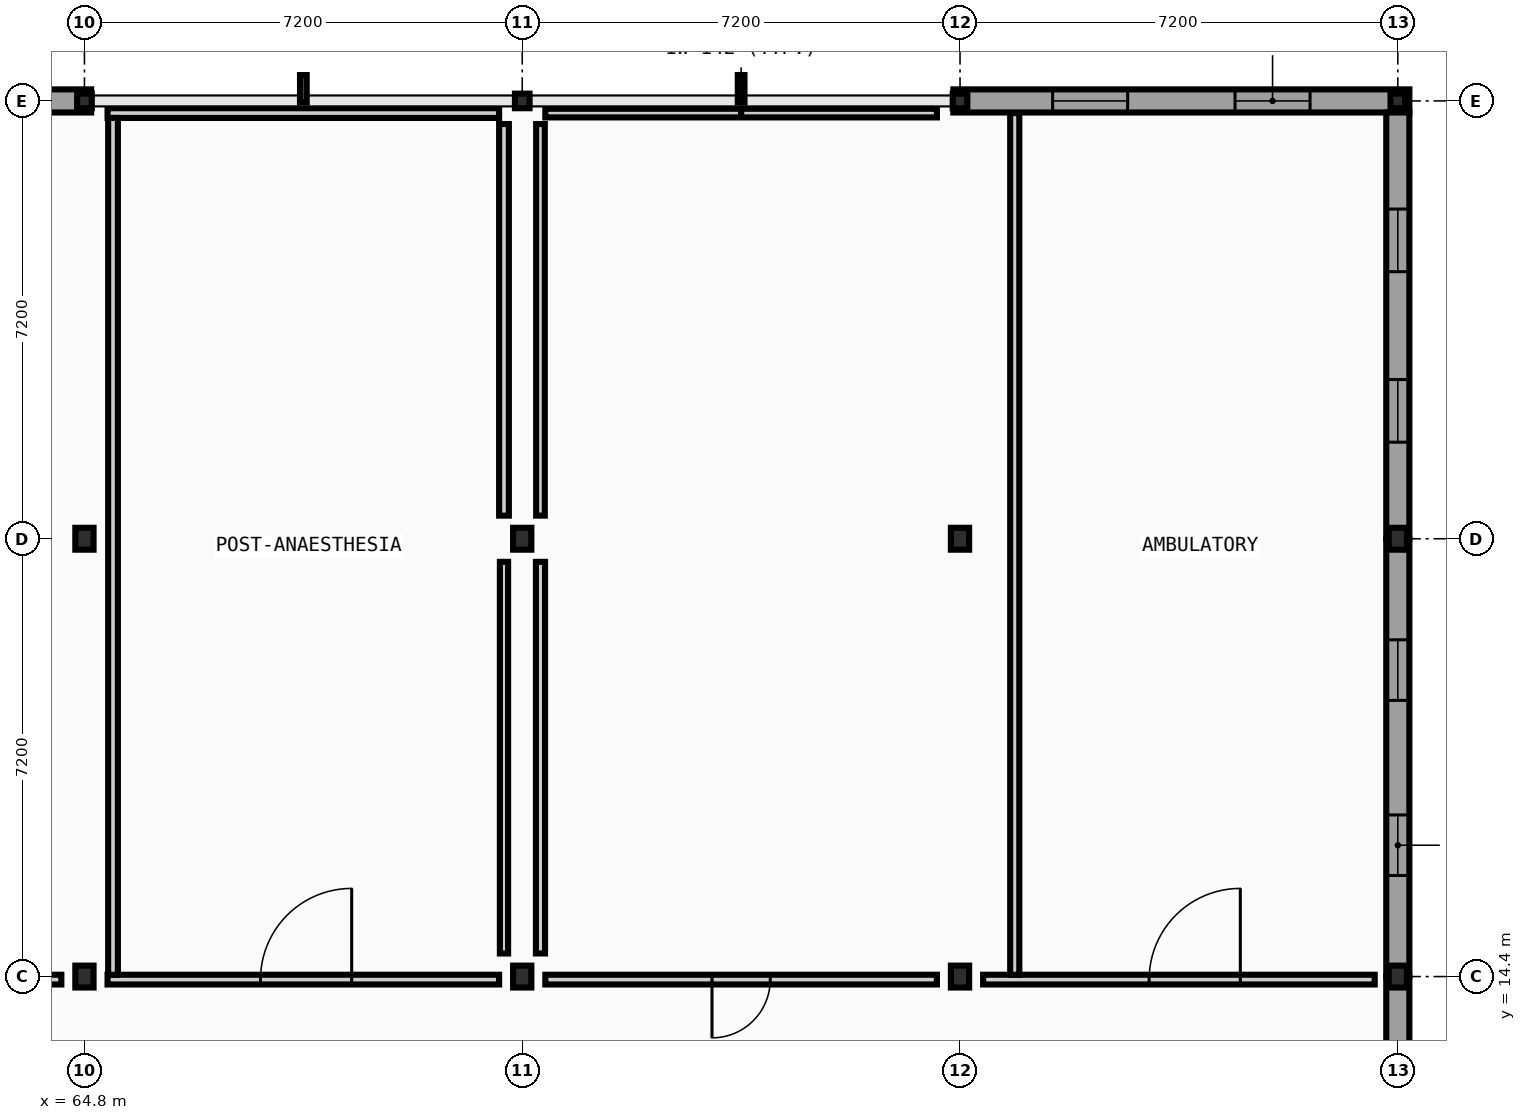
"""IFC4 building model, lengths in metres.
Left out: names, types, materials, properties, quantities, classifications, styles, units other than length and angle.
Written with IfcOpenShell. Run it as: python <this file> out.ifc"""

import sys

from ifc_helpers import new_model, si_unit, direction, frame, frame_2d, origin, origin_2d, place, context, subcontext, project, spatial, rectangle, i_section, extrude, element, fill, save


model = new_model("IFC4")
c1 = context("Model", 3, precision=1e-05, world=origin(), true_north=direction((0.0, 1.0)))
c2 = subcontext(c1, "Body", "Model", "MODEL_VIEW")
j1 = project(units=[si_unit("LENGTHUNIT", "METRE"), si_unit("PLANEANGLEUNIT", "RADIAN")], contexts=[c1])
p1 = place(None, origin())
s1 = spatial("IfcSite", under=j1, at=p1, CompositionType="ELEMENT")
p2 = place(p1, origin())
s2 = spatial("IfcBuilding", under=s1, at=p2, CompositionType="ELEMENT")
p3 = place(p2, frame((0.0, 0.0, 9.6)))
s3 = spatial("IfcBuildingStorey", under=s2, at=p3, CompositionType="ELEMENT", Elevation=9.6)
for number, where, z_axis, x_axis in (
    (1, (64.8, 14.4, 0.0), (0.0, 0.0, 1.0), (1.0, 0.0, 0.0)),
    (2, (64.8, 21.6, 0.0), (0.0, 0.0, 1.0), (1.0, 0.0, 0.0)),
):
    element("IfcColumn", number, at=place(p3, frame(where, z_axis=z_axis, x_axis=x_axis)), inside=s3, PredefinedType="COLUMN", context=c2, shape_type="SweptSolid", body=[
        extrude(i_section(OverallWidth=0.3, OverallDepth=0.36, WebThickness=0.012, FlangeThickness=0.022, FilletRadius=0.027, at=origin_2d()), origin(), (0.0, 0.0, 1.0), 4.4),
    ])
p4 = place(p3, frame((64.8, 28.8, 0.0), z_axis=(0.0, 0.0, 1.0), x_axis=(1.0, 0.0, 0.0)))
e3 = element("IfcColumn", 3, at=p4, inside=s3, PredefinedType="COLUMN", context=c2, shape_type="SweptSolid", body=[
    extrude(i_section(OverallWidth=0.24, OverallDepth=0.24, WebThickness=0.01, FlangeThickness=0.017, FilletRadius=0.021, at=origin_2d()), origin(), (0.0, 0.0, 1.0), 4.4),
])
for number, where, z_axis, x_axis in (
    (4, (72.0, 14.4, 0.0), (0.0, 0.0, 1.0), (1.0, 0.0, 0.0)),
    (5, (72.0, 21.6, 0.0), (0.0, 0.0, 1.0), (1.0, 0.0, 0.0)),
):
    element("IfcColumn", number, at=place(p3, frame(where, z_axis=z_axis, x_axis=x_axis)), inside=s3, PredefinedType="COLUMN", context=c2, shape_type="SweptSolid", body=[
        extrude(i_section(OverallWidth=0.3, OverallDepth=0.36, WebThickness=0.012, FlangeThickness=0.022, FilletRadius=0.027, at=origin_2d()), origin(), (0.0, 0.0, 1.0), 4.4),
    ])
p5 = place(p3, frame((72.0, 28.8, 0.0), z_axis=(0.0, 0.0, 1.0), x_axis=(1.0, 0.0, 0.0)))
e6 = element("IfcColumn", 6, at=p5, inside=s3, PredefinedType="COLUMN", context=c2, shape_type="SweptSolid", body=[
    extrude(i_section(OverallWidth=0.24, OverallDepth=0.24, WebThickness=0.01, FlangeThickness=0.017, FilletRadius=0.021, at=origin_2d()), origin(), (0.0, 0.0, 1.0), 4.4),
])
for number, where, z_axis, x_axis in (
    (7, (79.2, 14.4, 0.0), (0.0, 0.0, 1.0), (1.0, 0.0, 0.0)),
    (8, (79.2, 21.6, 0.0), (0.0, 0.0, 1.0), (1.0, 0.0, 0.0)),
):
    element("IfcColumn", number, at=place(p3, frame(where, z_axis=z_axis, x_axis=x_axis)), inside=s3, PredefinedType="COLUMN", context=c2, shape_type="SweptSolid", body=[
        extrude(i_section(OverallWidth=0.3, OverallDepth=0.36, WebThickness=0.012, FlangeThickness=0.022, FilletRadius=0.027, at=origin_2d()), origin(), (0.0, 0.0, 1.0), 4.4),
    ])
p6 = place(p3, frame((79.2, 28.8, 0.0), z_axis=(0.0, 0.0, 1.0), x_axis=(1.0, 0.0, 0.0)))
e9 = element("IfcColumn", 9, at=p6, inside=s3, PredefinedType="COLUMN", context=c2, shape_type="SweptSolid", body=[
    extrude(i_section(OverallWidth=0.24, OverallDepth=0.24, WebThickness=0.01, FlangeThickness=0.017, FilletRadius=0.021, at=origin_2d()), origin(), (0.0, 0.0, 1.0), 4.4),
])
for number, where, z_axis, x_axis in (
    (10, (86.4, 14.4, 0.0), (0.0, 0.0, 1.0), (1.0, 0.0, 0.0)),
    (11, (86.4, 21.6, 0.0), (0.0, 0.0, 1.0), (1.0, 0.0, 0.0)),
):
    element("IfcColumn", number, at=place(p3, frame(where, z_axis=z_axis, x_axis=x_axis)), inside=s3, PredefinedType="COLUMN", context=c2, shape_type="SweptSolid", body=[
        extrude(i_section(OverallWidth=0.3, OverallDepth=0.36, WebThickness=0.012, FlangeThickness=0.022, FilletRadius=0.027, at=origin_2d()), origin(), (0.0, 0.0, 1.0), 4.4),
    ])
p7 = place(p3, frame((86.4, 28.8, 0.0), z_axis=(0.0, 0.0, 1.0), x_axis=(1.0, 0.0, 0.0)))
e12 = element("IfcColumn", 12, at=p7, inside=s3, PredefinedType="COLUMN", context=c2, shape_type="SweptSolid", body=[
    extrude(i_section(OverallWidth=0.24, OverallDepth=0.24, WebThickness=0.01, FlangeThickness=0.017, FilletRadius=0.021, at=origin_2d()), origin(), (0.0, 0.0, 1.0), 4.4),
])
p8 = place(p3, frame((64.91, 28.8, 0.0), z_axis=(0.0, 0.0, 1.0), x_axis=(-1.0, 0.0, 0.0)))
e13 = element("IfcWall", 13, at=p8, inside=s3, PredefinedType="STANDARD", context=c2, shape_type="SweptSolid", body=[
    extrude(rectangle(XDim=6.4, YDim=0.38, at=frame_2d((3.2, 0.0))), origin(), (0.0, 0.0, 1.0), 3.9),
])
p9 = place(p3, frame((86.59, 28.8, 0.0), z_axis=(0.0, 0.0, 1.0), x_axis=(-1.0, 0.0, 0.0)))
e14 = element("IfcWall", 14, at=p9, inside=s3, PredefinedType="STANDARD", context=c2, shape_type="SweptSolid", body=[
    extrude(rectangle(XDim=7.5, YDim=0.38, at=frame_2d((3.75, 0.0))), origin(), (0.0, 0.0, 1.0), 3.9),
])
p10 = place(p9, frame((1.633, 0.0, 0.95)))
e15 = element("IfcOpeningElement", 15, at=p10, cuts=e14, PredefinedType="OPENING", context=c2, shape_type="SweptSolid", body=[
    extrude(rectangle(XDim=1.234, YDim=1.296, at=frame_2d((0.617, 0.648))), frame((0.0, 0.2, 0.0), z_axis=(0.0, -1.0, 0.0), x_axis=(1.0, 0.0, 0.0)), (0.0, 0.0, 1.0), 0.4),
])
p11 = place(p9, frame((4.633, 0.0, 0.95)))
e16 = element("IfcOpeningElement", 16, at=p11, cuts=e14, PredefinedType="OPENING", context=c2, shape_type="SweptSolid", body=[
    extrude(rectangle(XDim=1.234, YDim=1.296, at=frame_2d((0.617, 0.648))), frame((0.0, 0.2, 0.0), z_axis=(0.0, -1.0, 0.0), x_axis=(1.0, 0.0, 0.0)), (0.0, 0.0, 1.0), 0.4),
])
p12 = place(p3, frame((86.4, 8.9, 0.0), z_axis=(0.0, 0.0, 1.0), x_axis=(0.0, 1.0, 0.0)))
e17 = element("IfcWall", 17, at=p12, inside=s3, PredefinedType="STANDARD", context=c2, shape_type="SweptSolid", body=[
    extrude(rectangle(XDim=5.5, YDim=0.38, at=frame_2d((2.75, 0.0))), origin(), (0.0, 0.0, 1.0), 4.2),
])
p13 = place(p3, frame((86.4, 14.4, 0.0), z_axis=(0.0, 0.0, 1.0), x_axis=(0.0, 1.0, 0.0)))
e18 = element("IfcWall", 18, at=p13, inside=s3, PredefinedType="STANDARD", context=c2, shape_type="SweptSolid", body=[
    extrude(rectangle(XDim=7.2, YDim=0.38, at=frame_2d((3.6, 0.0))), origin(), (0.0, 0.0, 1.0), 3.885),
])
p14 = place(p13, frame((1.662, 0.0, 0.95)))
e19 = element("IfcOpeningElement", 19, at=p14, cuts=e18, PredefinedType="OPENING", context=c2, shape_type="SweptSolid", body=[
    extrude(rectangle(XDim=0.996, YDim=1.332, at=frame_2d((0.498, 0.666))), frame((0.0, 0.2, 0.0), z_axis=(0.0, -1.0, 0.0), x_axis=(1.0, 0.0, 0.0)), (0.0, 0.0, 1.0), 0.4),
])
p15 = place(p13, frame((4.542, 0.0, 0.95)))
e20 = element("IfcOpeningElement", 20, at=p15, cuts=e18, PredefinedType="OPENING", context=c2, shape_type="SweptSolid", body=[
    extrude(rectangle(XDim=0.996, YDim=1.332, at=frame_2d((0.498, 0.666))), frame((0.0, 0.2, 0.0), z_axis=(0.0, -1.0, 0.0), x_axis=(1.0, 0.0, 0.0)), (0.0, 0.0, 1.0), 0.4),
])
p16 = place(p3, frame((86.4, 21.6, 0.0), z_axis=(0.0, 0.0, 1.0), x_axis=(0.0, 1.0, 0.0)))
e21 = element("IfcWall", 21, at=p16, inside=s3, PredefinedType="STANDARD", context=c2, shape_type="SweptSolid", body=[
    extrude(rectangle(XDim=7.01, YDim=0.38, at=frame_2d((3.505, 0.0))), origin(), (0.0, 0.0, 1.0), 3.89),
])
p17 = place(p16, frame((1.588, 0.0, 0.95)))
e22 = element("IfcOpeningElement", 22, at=p17, cuts=e21, PredefinedType="OPENING", context=c2, shape_type="SweptSolid", body=[
    extrude(rectangle(XDim=1.03, YDim=1.332, at=frame_2d((0.515, 0.666))), frame((0.0, 0.2, 0.0), z_axis=(0.0, -1.0, 0.0), x_axis=(1.0, 0.0, 0.0)), (0.0, 0.0, 1.0), 0.4),
])
p18 = place(p16, frame((4.392, 0.0, 0.95)))
e23 = element("IfcOpeningElement", 23, at=p18, cuts=e21, PredefinedType="OPENING", context=c2, shape_type="SweptSolid", body=[
    extrude(rectangle(XDim=1.03, YDim=1.332, at=frame_2d((0.515, 0.666))), frame((0.0, 0.2, 0.0), z_axis=(0.0, -1.0, 0.0), x_axis=(1.0, 0.0, 0.0)), (0.0, 0.0, 1.0), 0.4),
])
p19 = place(p3, frame((58.7, 14.35, 0.0), z_axis=(0.0, 0.0, 1.0), x_axis=(1.0, 0.0, 0.0)))
e24 = element("IfcWall", 24, at=p19, inside=s3, PredefinedType="PARTITIONING", context=c2, shape_type="SweptSolid", body=[
    extrude(rectangle(XDim=5.72, YDim=0.16, at=frame_2d((2.86, 0.0))), origin(), (0.0, 0.0, 1.0), 3.895),
])
p20 = place(p19, frame((1.96, 0.0, 0.0)))
e25 = element("IfcOpeningElement", 25, at=p20, cuts=e24, PredefinedType="OPENING", context=c2, shape_type="SweptSolid", body=[
    extrude(rectangle(XDim=1.8, YDim=2.3, at=frame_2d((0.9, 1.15))), frame((0.0, 0.09, 0.0), z_axis=(0.0, -1.0, 0.0), x_axis=(1.0, 0.0, 0.0)), (0.0, 0.0, 1.0), 0.18),
])
p21 = place(p3, frame((65.18, 14.35, 0.0), z_axis=(0.0, 0.0, 1.0), x_axis=(1.0, 0.0, 0.0)))
e26 = element("IfcWall", 26, at=p21, inside=s3, PredefinedType="PARTITIONING", context=c2, shape_type="SweptSolid", body=[
    extrude(rectangle(XDim=6.44, YDim=0.16, at=frame_2d((3.22, 0.0))), origin(), (0.0, 0.0, 1.0), 3.895),
])
p22 = place(p21, frame((2.515, 0.0, 0.0)))
e27 = element("IfcOpeningElement", 27, at=p22, cuts=e26, PredefinedType="OPENING", context=c2, shape_type="SweptSolid", body=[
    extrude(rectangle(XDim=1.5, YDim=2.2, at=frame_2d((0.75, 1.1))), frame((0.0, 0.09, 0.0), z_axis=(0.0, -1.0, 0.0), x_axis=(1.0, 0.0, 0.0)), (0.0, 0.0, 1.0), 0.18),
])
p23 = place(p3, frame((72.38, 14.35, 0.0), z_axis=(0.0, 0.0, 1.0), x_axis=(1.0, 0.0, 0.0)))
e28 = element("IfcWall", 28, at=p23, inside=s3, PredefinedType="PARTITIONING", context=c2, shape_type="SweptSolid", body=[
    extrude(rectangle(XDim=6.44, YDim=0.16, at=frame_2d((3.22, 0.0))), origin(), (0.0, 0.0, 1.0), 3.895),
])
p24 = place(p23, frame((2.741, 0.0, 0.0)))
e29 = element("IfcOpeningElement", 29, at=p24, cuts=e28, PredefinedType="OPENING", context=c2, shape_type="SweptSolid", body=[
    extrude(rectangle(XDim=0.958, YDim=2.152, at=frame_2d((0.479, 1.076))), frame((0.0, 0.09, 0.0), z_axis=(0.0, -1.0, 0.0), x_axis=(1.0, 0.0, 0.0)), (0.0, 0.0, 1.0), 0.18),
])
p25 = place(p3, frame((79.58, 14.35, 0.0), z_axis=(0.0, 0.0, 1.0), x_axis=(1.0, 0.0, 0.0)))
e30 = element("IfcWall", 30, at=p25, inside=s3, PredefinedType="PARTITIONING", context=c2, shape_type="SweptSolid", body=[
    extrude(rectangle(XDim=6.44, YDim=0.16, at=frame_2d((3.22, 0.0))), origin(), (0.0, 0.0, 1.0), 3.895),
])
p26 = place(p25, frame((2.73, 0.0, 0.0)))
e31 = element("IfcOpeningElement", 31, at=p26, cuts=e30, PredefinedType="OPENING", context=c2, shape_type="SweptSolid", body=[
    extrude(rectangle(XDim=1.5, YDim=2.2, at=frame_2d((0.75, 1.1))), frame((0.0, 0.09, 0.0), z_axis=(0.0, -1.0, 0.0), x_axis=(1.0, 0.0, 0.0)), (0.0, 0.0, 1.0), 0.18),
])
p27 = place(p3, frame((65.18, 28.6, 0.0), z_axis=(0.0, 0.0, 1.0), x_axis=(1.0, 0.0, 0.0)))
e32 = element("IfcWall", 32, at=p27, inside=s3, PredefinedType="PARTITIONING", context=c2, shape_type="SweptSolid", body=[
    extrude(rectangle(XDim=6.44, YDim=0.16, at=frame_2d((3.22, 0.0))), origin(), (0.0, 0.0, 1.0), 3.9),
])
p28 = place(p3, frame((72.38, 28.6, 0.0), z_axis=(0.0, 0.0, 1.0), x_axis=(1.0, 0.0, 0.0)))
e33 = element("IfcWall", 33, at=p28, inside=s3, PredefinedType="PARTITIONING", context=c2, shape_type="SweptSolid", body=[
    extrude(rectangle(XDim=6.44, YDim=0.142, at=frame_2d((3.22, 0.0))), origin(), (0.0, 0.0, 1.0), 3.9),
])
p29 = place(p3, frame((65.27, 14.43, 0.0), z_axis=(0.0, 0.0, 1.0), x_axis=(0.0, 1.0, 0.0)))
e34 = element("IfcWall", 34, at=p29, inside=s3, PredefinedType="PARTITIONING", context=c2, shape_type="SweptSolid", body=[
    extrude(rectangle(XDim=14.09, YDim=0.16, at=frame_2d((7.045, 0.0))), origin(), (0.0, 0.0, 1.0), 4.2),
])
p30 = place(p3, frame((71.7, 14.78, 0.0), z_axis=(0.0, 0.0, 1.0), x_axis=(0.0, 1.0, 0.0)))
e35 = element("IfcWall", 35, at=p30, inside=s3, PredefinedType="PARTITIONING", context=c2, shape_type="SweptSolid", body=[
    extrude(rectangle(XDim=6.44, YDim=0.135, at=frame_2d((3.22, 0.0))), origin(), (0.0, 0.0, 1.0), 4.2),
])
p31 = place(p3, frame((71.7, 21.98, 0.0), z_axis=(0.0, 0.0, 1.0), x_axis=(0.0, 1.0, 0.0)))
e36 = element("IfcWall", 36, at=p31, inside=s3, PredefinedType="PARTITIONING", context=c2, shape_type="SweptSolid", body=[
    extrude(rectangle(XDim=6.44, YDim=0.16, at=frame_2d((3.22, 0.0))), origin(), (0.0, 0.0, 1.0), 3.9),
])
p32 = place(p3, frame((72.3, 14.78, 0.0), z_axis=(0.0, 0.0, 1.0), x_axis=(0.0, 1.0, 0.0)))
e37 = element("IfcWall", 37, at=p32, inside=s3, PredefinedType="PARTITIONING", context=c2, shape_type="SweptSolid", body=[
    extrude(rectangle(XDim=6.44, YDim=0.15, at=frame_2d((3.22, 0.0))), origin(), (0.0, 0.0, 1.0), 3.895),
])
p33 = place(p3, frame((72.3, 21.98, 0.0), z_axis=(0.0, 0.0, 1.0), x_axis=(0.0, 1.0, 0.0)))
e38 = element("IfcWall", 38, at=p33, inside=s3, PredefinedType="PARTITIONING", context=c2, shape_type="SweptSolid", body=[
    extrude(rectangle(XDim=6.44, YDim=0.142, at=frame_2d((3.22, 0.0))), origin(), (0.0, 0.0, 1.0), 3.9),
])
p34 = place(p3, frame((80.1, 14.43, 0.0), z_axis=(0.0, 0.0, 1.0), x_axis=(0.0, 1.0, 0.0)))
e39 = element("IfcWall", 39, at=p34, inside=s3, PredefinedType="PARTITIONING", context=c2, shape_type="SweptSolid", body=[
    extrude(rectangle(XDim=14.17, YDim=0.15, at=frame_2d((7.085, 0.0))), origin(), (0.0, 0.0, 1.0), 4.2),
])
p35 = place(p10, origin())
e40 = element("IfcWindow", 40, at=p35, inside=s3, PartitioningType="SINGLE_PANEL", PredefinedType="WINDOW", context=c2, shape_type="SweptSolid", body=[
    extrude(rectangle(XDim=1.234, YDim=1.296, at=frame_2d((0.617, 0.648))), frame((0.0, 0.03, 0.0), z_axis=(0.0, -1.0, 0.0), x_axis=(1.0, 0.0, 0.0)), (0.0, 0.0, 1.0), 0.06),
])
fill(e15, e40)
p36 = place(p11, origin())
e41 = element("IfcWindow", 41, at=p36, inside=s3, PartitioningType="SINGLE_PANEL", PredefinedType="WINDOW", context=c2, shape_type="SweptSolid", body=[
    extrude(rectangle(XDim=1.234, YDim=1.296, at=frame_2d((0.617, 0.648))), frame((0.0, 0.03, 0.0), z_axis=(0.0, -1.0, 0.0), x_axis=(1.0, 0.0, 0.0)), (0.0, 0.0, 1.0), 0.06),
])
fill(e16, e41)
p37 = place(p14, origin())
e42 = element("IfcWindow", 42, at=p37, inside=s3, PartitioningType="SINGLE_PANEL", PredefinedType="WINDOW", context=c2, shape_type="SweptSolid", body=[
    extrude(rectangle(XDim=0.996, YDim=1.332, at=frame_2d((0.498, 0.666))), frame((0.0, 0.03, 0.0), z_axis=(0.0, -1.0, 0.0), x_axis=(1.0, 0.0, 0.0)), (0.0, 0.0, 1.0), 0.06),
])
fill(e19, e42)
p38 = place(p15, origin())
e43 = element("IfcWindow", 43, at=p38, inside=s3, PartitioningType="SINGLE_PANEL", PredefinedType="WINDOW", context=c2, shape_type="SweptSolid", body=[
    extrude(rectangle(XDim=0.996, YDim=1.332, at=frame_2d((0.498, 0.666))), frame((0.0, 0.03, 0.0), z_axis=(0.0, -1.0, 0.0), x_axis=(1.0, 0.0, 0.0)), (0.0, 0.0, 1.0), 0.06),
])
fill(e20, e43)
p39 = place(p17, origin())
e44 = element("IfcWindow", 44, at=p39, inside=s3, PartitioningType="SINGLE_PANEL", PredefinedType="WINDOW", context=c2, shape_type="SweptSolid", body=[
    extrude(rectangle(XDim=1.03, YDim=1.332, at=frame_2d((0.515, 0.666))), frame((0.0, 0.03, 0.0), z_axis=(0.0, -1.0, 0.0), x_axis=(1.0, 0.0, 0.0)), (0.0, 0.0, 1.0), 0.06),
])
fill(e22, e44)
p40 = place(p18, origin())
e45 = element("IfcWindow", 45, at=p40, inside=s3, PartitioningType="SINGLE_PANEL", PredefinedType="WINDOW", context=c2, shape_type="SweptSolid", body=[
    extrude(rectangle(XDim=1.03, YDim=1.332, at=frame_2d((0.515, 0.666))), frame((0.0, 0.03, 0.0), z_axis=(0.0, -1.0, 0.0), x_axis=(1.0, 0.0, 0.0)), (0.0, 0.0, 1.0), 0.06),
])
fill(e23, e45)
p41 = place(p26, frame((1.5, 0.0, 0.0), z_axis=(0.0, 0.0, 1.0), x_axis=(-1.0, 0.0, 0.0)))
e46 = element("IfcDoor", 46, at=p41, inside=s3, OperationType="DOUBLE_DOOR_SINGLE_SWING", PredefinedType="DOOR", context=c2, shape_type="SweptSolid", body=[
    extrude(rectangle(XDim=1.5, YDim=2.2, at=frame_2d((0.75, 1.1))), frame((0.0, 0.025, 0.0), z_axis=(0.0, -1.0, 0.0), x_axis=(1.0, 0.0, 0.0)), (0.0, 0.0, 1.0), 0.05),
])
fill(e31, e46)
p42 = place(p22, frame((1.5, 0.0, 0.0), z_axis=(0.0, 0.0, 1.0), x_axis=(-1.0, 0.0, 0.0)))
e47 = element("IfcDoor", 47, at=p42, inside=s3, OperationType="DOUBLE_DOOR_SINGLE_SWING", PredefinedType="DOOR", context=c2, shape_type="SweptSolid", body=[
    extrude(rectangle(XDim=1.5, YDim=2.2, at=frame_2d((0.75, 1.1))), frame((0.0, 0.025, 0.0), z_axis=(0.0, -1.0, 0.0), x_axis=(1.0, 0.0, 0.0)), (0.0, 0.0, 1.0), 0.05),
])
fill(e27, e47)
p43 = place(p24, frame((0.958, 0.0, 0.0), z_axis=(0.0, 0.0, 1.0), x_axis=(-1.0, 0.0, 0.0)))
e48 = element("IfcDoor", 48, at=p43, inside=s3, OperationType="SINGLE_SWING_LEFT", PredefinedType="DOOR", context=c2, shape_type="SweptSolid", body=[
    extrude(rectangle(XDim=0.958, YDim=2.152, at=frame_2d((0.479, 1.076))), frame((0.0, 0.025, 0.0), z_axis=(0.0, -1.0, 0.0), x_axis=(1.0, 0.0, 0.0)), (0.0, 0.0, 1.0), 0.05),
])
fill(e29, e48)
save(model, sys.argv[1])
